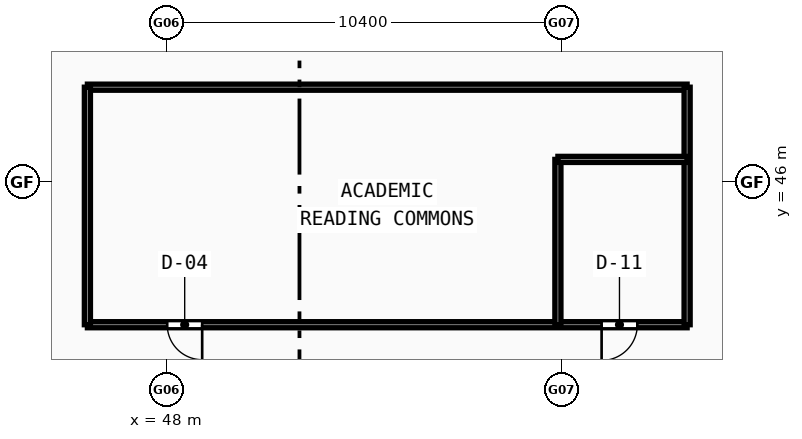
"""IFC4 building model, lengths in metres.
Left out: names, types, materials, properties, quantities, classifications, styles, units other than length and angle.
Written with IfcOpenShell. Run it as: python <this file> out.ifc"""

import sys

from ifc_helpers import new_model, si_unit, direction, frame, frame_2d, origin, place, context, subcontext, project, spatial, rectangle, extrude, source, transform, mapped, element, fill, save


model = new_model("IFC4")
c1 = context("Model", 3, precision=1e-05, world=origin(), true_north=direction((0.0, 1.0)))
c2 = subcontext(c1, "Body", "Model", "MODEL_VIEW")
j1 = project(units=[si_unit("LENGTHUNIT", "METRE"), si_unit("PLANEANGLEUNIT", "RADIAN")], contexts=[c1])
p1 = place(None, origin())
s1 = spatial("IfcSite", under=j1, at=p1, CompositionType="ELEMENT")
p2 = place(p1, origin())
s2 = spatial("IfcBuilding", under=s1, at=p2, CompositionType="ELEMENT")
p3 = place(p2, frame((0.0, 0.0, 30.4)))
s3 = spatial("IfcBuildingStorey", under=s2, at=p3, CompositionType="ELEMENT", Elevation=30.4)
p4 = place(p3, frame((45.92, 42.25, 0.0), z_axis=(0.0, 0.0, 1.0), x_axis=(1.0, 0.0, 0.0)))
e1 = element("IfcWall", 1, at=p4, inside=s3, PredefinedType="PARTITIONING", context=c2, shape_type="SweptSolid", body=[
    extrude(rectangle(XDim=15.78, YDim=0.16, at=frame_2d((7.89, 0.0))), origin(), (0.0, 0.0, 1.0), 2.67),
])
p5 = place(p4, frame((2.1, 0.0, 0.0)))
e2 = element("IfcOpeningElement", 2, at=p5, cuts=e1, PredefinedType="OPENING", context=c2, shape_type="SweptSolid", body=[
    extrude(rectangle(XDim=0.92, YDim=2.1, at=frame_2d((0.46, 1.05))), frame((0.0, 0.09, 0.0), z_axis=(0.0, -1.0, 0.0), x_axis=(1.0, 0.0, 0.0)), (0.0, 0.0, 1.0), 0.18),
])
p6 = place(p4, frame((13.53, 0.0, 0.0)))
e3 = element("IfcOpeningElement", 3, at=p6, cuts=e1, PredefinedType="OPENING", context=c2, shape_type="SweptSolid", body=[
    extrude(rectangle(XDim=0.94, YDim=2.1, at=frame_2d((0.47, 1.05))), frame((0.0, 0.09, 0.0), z_axis=(0.0, -1.0, 0.0), x_axis=(1.0, 0.0, 0.0)), (0.0, 0.0, 1.0), 0.18),
])
p7 = place(p3, frame((45.92, 48.5, 0.0), z_axis=(0.0, 0.0, 1.0), x_axis=(1.0, 0.0, 0.0)))
e4 = element("IfcWall", 4, at=p7, inside=s3, PredefinedType="PARTITIONING", context=c2, shape_type="SweptSolid", body=[
    extrude(rectangle(XDim=15.78, YDim=0.16, at=frame_2d((7.89, 0.0))), origin(), (0.0, 0.0, 1.0), 2.67),
])
p8 = place(p3, frame((45.92, 42.25, 0.0), z_axis=(0.0, 0.0, 1.0), x_axis=(0.0, 1.0, 0.0)))
e5 = element("IfcWall", 5, at=p8, inside=s3, PredefinedType="PARTITIONING", context=c2, shape_type="SweptSolid", body=[
    extrude(rectangle(XDim=6.25, YDim=0.16, at=frame_2d((3.125, 0.0))), origin(), (0.0, 0.0, 1.0), 3.37),
])
p9 = place(p3, frame((61.7, 42.25, 0.0), z_axis=(0.0, 0.0, 1.0), x_axis=(0.0, 1.0, 0.0)))
e6 = element("IfcWall", 6, at=p9, inside=s3, PredefinedType="PARTITIONING", context=c2, shape_type="SweptSolid", body=[
    extrude(rectangle(XDim=6.25, YDim=0.16, at=frame_2d((3.125, 0.0))), origin(), (0.0, 0.0, 1.0), 2.67),
])
p10 = place(p3, frame((58.3, 42.25, 0.0), z_axis=(0.0, 0.0, 1.0), x_axis=(0.0, 1.0, 0.0)))
e7 = element("IfcWall", 7, at=p10, inside=s3, PredefinedType="PARTITIONING", context=c2, shape_type="SweptSolid", body=[
    extrude(rectangle(XDim=4.35, YDim=0.16, at=frame_2d((2.175, 0.0))), origin(), (0.0, 0.0, 1.0), 2.67),
])
p11 = place(p3, frame((58.3, 46.6, 0.0), z_axis=(0.0, 0.0, 1.0), x_axis=(1.0, 0.0, 0.0)))
e8 = element("IfcWall", 8, at=p11, inside=s3, PredefinedType="PARTITIONING", context=c2, shape_type="SweptSolid", body=[
    extrude(rectangle(XDim=3.4, YDim=0.16, at=frame_2d((1.7, 0.0))), origin(), (0.0, 0.0, 1.0), 2.97),
])
m1 = source(origin(), c2, "Body", "SweptSolid", [
    extrude(rectangle(XDim=0.92, YDim=2.1, at=frame_2d((0.46, 1.05))), frame((0.0, 0.025, 0.0), z_axis=(0.0, -1.0, 0.0), x_axis=(1.0, 0.0, 0.0)), (0.0, 0.0, 1.0), 0.05),
])
p12 = place(p5, frame((0.92, 0.0, 0.0), z_axis=(0.0, 0.0, 1.0), x_axis=(-1.0, 0.0, 0.0)))
e9 = element("IfcDoor", 9, at=p12, inside=s3, OperationType="SINGLE_SWING_LEFT", PredefinedType="DOOR", context=c2, shape_type="MappedRepresentation", body=[
    mapped(m1, transform((0.0, 0.0, 0.0), scale=1.0)),
])
fill(e2, e9)
m2 = source(origin(), c2, "Body", "SweptSolid", [
    extrude(rectangle(XDim=0.94, YDim=2.1, at=frame_2d((0.47, 1.05))), frame((0.0, 0.025, 0.0), z_axis=(0.0, -1.0, 0.0), x_axis=(1.0, 0.0, 0.0)), (0.0, 0.0, 1.0), 0.05),
])
p13 = place(p6, frame((0.94, 0.0, 0.0), z_axis=(0.0, 0.0, 1.0), x_axis=(-1.0, 0.0, 0.0)))
e10 = element("IfcDoor", 10, at=p13, inside=s3, OperationType="SINGLE_SWING_RIGHT", PredefinedType="DOOR", context=c2, shape_type="MappedRepresentation", body=[
    mapped(m2, transform((0.0, 0.0, 0.0), scale=1.0)),
])
fill(e3, e10)
save(model, sys.argv[1])
